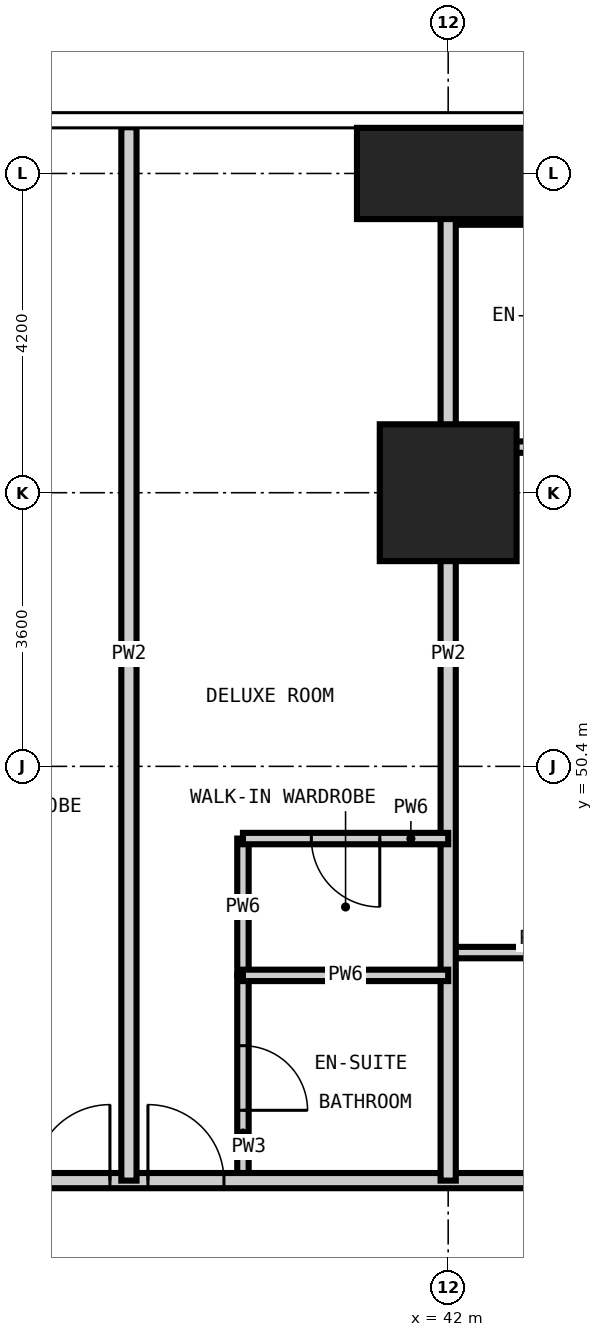
"""IFC4 building model, lengths in metres.
Left out: names, types, materials, properties, quantities, classifications, styles, units other than length and angle.
Written with IfcOpenShell. Run it as: python <this file> out.ifc"""

import sys

from ifc_helpers import new_model, si_unit, direction, frame, frame_2d, origin, origin_2d, place, context, subcontext, project, spatial, rectangle, extrude, element, fill, save


model = new_model("IFC4")
c1 = context("Model", 3, precision=1e-05, world=origin(), true_north=direction((0.0, 1.0)))
c2 = subcontext(c1, "Body", "Model", "MODEL_VIEW")
j1 = project(units=[si_unit("LENGTHUNIT", "METRE"), si_unit("PLANEANGLEUNIT", "RADIAN")], contexts=[c1])
p1 = place(None, origin())
s1 = spatial("IfcSite", under=j1, at=p1, CompositionType="ELEMENT")
p2 = place(p1, origin())
s2 = spatial("IfcBuilding", under=s1, at=p2, CompositionType="ELEMENT")
p3 = place(p2, frame((0.0, 0.0, 63.0)))
s3 = spatial("IfcBuildingStorey", under=s2, at=p3, CompositionType="ELEMENT", Elevation=63.0)
p4 = place(p3, frame((42.0, 54.0, -0.35), z_axis=(0.0, 0.0, 1.0), x_axis=(1.0, 0.0, 0.0)))
e1 = element("IfcColumn", 1, at=p4, inside=s3, PredefinedType="COLUMN", context=c2, shape_type="SweptSolid", body=[
    extrude(rectangle(XDim=1.8, YDim=1.8, at=origin_2d()), origin(), (0.0, 0.0, 1.0), 3.6),
])
p5 = place(p3, frame((42.0, 58.2, -0.35), z_axis=(0.0, 0.0, 1.0), x_axis=(1.0, 0.0, 0.0)))
e2 = element("IfcColumn", 2, at=p5, inside=s3, PredefinedType="COLUMN", context=c2, shape_type="SweptSolid", body=[
    extrude(rectangle(XDim=2.4, YDim=1.2, at=origin_2d()), origin(), (0.0, 0.0, 1.0), 3.6),
])
p6 = place(p3, frame((39.3, 44.95, 0.0), z_axis=(0.0, 0.0, 1.0), x_axis=(0.0, 1.0, 0.0)))
e3 = element("IfcWall", 3, at=p6, inside=s3, PredefinedType="PARTITIONING", context=c2, shape_type="SweptSolid", body=[
    extrude(rectangle(XDim=2.7, YDim=0.15, at=frame_2d((1.35, 0.0))), origin(), (0.0, 0.0, 1.0), 3.25),
])
p7 = place(p6, frame((0.925, 0.0, 0.0)))
e4 = element("IfcOpeningElement", 4, at=p7, cuts=e3, PredefinedType="OPENING", context=c2, shape_type="SweptSolid", body=[
    extrude(rectangle(XDim=0.85, YDim=2.1, at=frame_2d((0.425, 1.05))), frame((0.0, 0.085, 0.0), z_axis=(0.0, -1.0, 0.0), x_axis=(1.0, 0.0, 0.0)), (0.0, 0.0, 1.0), 0.17),
])
p8 = place(p3, frame((42.0, 47.95, 0.0), z_axis=(0.0, 0.0, 1.0), x_axis=(1.0, 0.0, 0.0)))
e5 = element("IfcWall", 5, at=p8, inside=s3, PredefinedType="PARTITIONING", context=c2, shape_type="SweptSolid", body=[
    extrude(rectangle(XDim=4.15, YDim=0.15, at=frame_2d((2.075, 0.0))), origin(), (0.0, 0.0, 1.0), 3.25),
])
p9 = place(p8, frame((1.65, 0.0, 0.0)))
e6 = element("IfcOpeningElement", 6, at=p9, cuts=e5, PredefinedType="OPENING", context=c2, shape_type="SweptSolid", body=[
    extrude(rectangle(XDim=0.85, YDim=2.1, at=frame_2d((0.425, 1.05))), frame((0.0, 0.085, 0.0), z_axis=(0.0, -1.0, 0.0), x_axis=(1.0, 0.0, 0.0)), (0.0, 0.0, 1.0), 0.17),
])
p10 = place(p3, frame((42.0, 57.6, 0.0), z_axis=(0.0, 0.0, 1.0), x_axis=(1.0, 0.0, 0.0)))
e7 = element("IfcWall", 7, at=p10, inside=s3, PredefinedType="PARTITIONING", context=c2, shape_type="SweptSolid", body=[
    extrude(rectangle(XDim=3.6, YDim=0.15, at=frame_2d((1.8, 0.0))), origin(), (0.0, 0.0, 1.0), 3.25),
])
p11 = place(p10, frame((1.375, 0.0, 0.0)))
e8 = element("IfcOpeningElement", 8, at=p11, cuts=e7, PredefinedType="OPENING", context=c2, shape_type="SweptSolid", body=[
    extrude(rectangle(XDim=0.85, YDim=2.1, at=frame_2d((0.425, 1.05))), frame((0.0, 0.085, 0.0), z_axis=(0.0, -1.0, 0.0), x_axis=(1.0, 0.0, 0.0)), (0.0, 0.0, 1.0), 0.17),
])
p12 = place(p3, frame((13.25, 44.95, 0.0), z_axis=(0.0, 0.0, 1.0), x_axis=(1.0, 0.0, 0.0)))
e9 = element("IfcWall", 9, at=p12, inside=s3, PredefinedType="PARTITIONING", context=c2, shape_type="SweptSolid", body=[
    extrude(rectangle(XDim=32.9, YDim=0.2, at=frame_2d((16.45, 0.0))), origin(), (0.0, 0.0, 1.0), 3.25),
])
p13 = place(p12, frame((6.5, 0.0, 0.0)))
e10 = element("IfcOpeningElement", 10, at=p13, cuts=e9, PredefinedType="OPENING", context=c2, shape_type="SweptSolid", body=[
    extrude(rectangle(XDim=1.0, YDim=2.2, at=frame_2d((0.5, 1.1))), frame((0.0, 0.11, 0.0), z_axis=(0.0, -1.0, 0.0), x_axis=(1.0, 0.0, 0.0)), (0.0, 0.0, 1.0), 0.22),
])
p14 = place(p12, frame((8.0, 0.0, 0.0)))
e11 = element("IfcOpeningElement", 11, at=p14, cuts=e9, PredefinedType="OPENING", context=c2, shape_type="SweptSolid", body=[
    extrude(rectangle(XDim=1.0, YDim=2.2, at=frame_2d((0.5, 1.1))), frame((0.0, 0.11, 0.0), z_axis=(0.0, -1.0, 0.0), x_axis=(1.0, 0.0, 0.0)), (0.0, 0.0, 1.0), 0.22),
])
p15 = place(p12, frame((14.9, 0.0, 0.0)))
e12 = element("IfcOpeningElement", 12, at=p15, cuts=e9, PredefinedType="OPENING", context=c2, shape_type="SweptSolid", body=[
    extrude(rectangle(XDim=1.0, YDim=2.2, at=frame_2d((0.5, 1.1))), frame((0.0, 0.11, 0.0), z_axis=(0.0, -1.0, 0.0), x_axis=(1.0, 0.0, 0.0)), (0.0, 0.0, 1.0), 0.22),
])
p16 = place(p12, frame((16.4, 0.0, 0.0)))
e13 = element("IfcOpeningElement", 13, at=p16, cuts=e9, PredefinedType="OPENING", context=c2, shape_type="SweptSolid", body=[
    extrude(rectangle(XDim=1.0, YDim=2.2, at=frame_2d((0.5, 1.1))), frame((0.0, 0.11, 0.0), z_axis=(0.0, -1.0, 0.0), x_axis=(1.0, 0.0, 0.0)), (0.0, 0.0, 1.0), 0.22),
])
p17 = place(p12, frame((23.3, 0.0, 0.0)))
e14 = element("IfcOpeningElement", 14, at=p17, cuts=e9, PredefinedType="OPENING", context=c2, shape_type="SweptSolid", body=[
    extrude(rectangle(XDim=1.0, YDim=2.2, at=frame_2d((0.5, 1.1))), frame((0.0, 0.11, 0.0), z_axis=(0.0, -1.0, 0.0), x_axis=(1.0, 0.0, 0.0)), (0.0, 0.0, 1.0), 0.22),
])
p18 = place(p12, frame((24.8, 0.0, 0.0)))
e15 = element("IfcOpeningElement", 15, at=p18, cuts=e9, PredefinedType="OPENING", context=c2, shape_type="SweptSolid", body=[
    extrude(rectangle(XDim=1.0, YDim=2.2, at=frame_2d((0.5, 1.1))), frame((0.0, 0.11, 0.0), z_axis=(0.0, -1.0, 0.0), x_axis=(1.0, 0.0, 0.0)), (0.0, 0.0, 1.0), 0.22),
])
for number, where, z_axis, x_axis in (
    (16, (37.8, 44.95, 0.0), (0.0, 0.0, 1.0), (0.0, 1.0, 0.0)),
    (17, (42.0, 44.95, 0.0), (0.0, 0.0, 1.0), (0.0, 1.0, 0.0)),
):
    element("IfcWall", number, at=place(p3, frame(where, z_axis=z_axis, x_axis=x_axis)), inside=s3, PredefinedType="PARTITIONING", context=c2, shape_type="SweptSolid", body=[
        extrude(rectangle(XDim=13.858, YDim=0.2, at=frame_2d((6.929, 0.0))), origin(), (0.0, 0.0, 1.0), 3.25),
    ])
p19 = place(p3, frame((39.3, 47.65, 0.0), z_axis=(0.0, 0.0, 1.0), x_axis=(0.0, 1.0, 0.0)))
e18 = element("IfcWall", 18, at=p19, inside=s3, PredefinedType="PARTITIONING", context=c2, shape_type="SweptSolid", body=[
    extrude(rectangle(XDim=1.8, YDim=0.15, at=frame_2d((0.9, 0.0))), origin(), (0.0, 0.0, 1.0), 3.25),
])
p20 = place(p3, frame((39.3, 47.65, 0.0), z_axis=(0.0, 0.0, 1.0), x_axis=(1.0, 0.0, 0.0)))
e19 = element("IfcWall", 19, at=p20, inside=s3, PredefinedType="PARTITIONING", context=c2, shape_type="SweptSolid", body=[
    extrude(rectangle(XDim=2.7, YDim=0.15, at=frame_2d((1.35, 0.0))), origin(), (0.0, 0.0, 1.0), 3.25),
])
p21 = place(p3, frame((39.3, 49.45, 0.0), z_axis=(0.0, 0.0, 1.0), x_axis=(1.0, 0.0, 0.0)))
e20 = element("IfcWall", 20, at=p21, inside=s3, PredefinedType="PARTITIONING", context=c2, shape_type="SweptSolid", body=[
    extrude(rectangle(XDim=2.7, YDim=0.15, at=frame_2d((1.35, 0.0))), origin(), (0.0, 0.0, 1.0), 3.25),
])
p22 = place(p21, frame((0.9, 0.0, 0.0)))
e21 = element("IfcOpeningElement", 21, at=p22, cuts=e20, PredefinedType="OPENING", context=c2, shape_type="SweptSolid", body=[
    extrude(rectangle(XDim=0.9, YDim=2.1, at=frame_2d((0.45, 1.05))), frame((0.0, 0.085, 0.0), z_axis=(0.0, -1.0, 0.0), x_axis=(1.0, 0.0, 0.0)), (0.0, 0.0, 1.0), 0.17),
])
p23 = place(p3, frame((42.0, 54.6, 0.0), z_axis=(0.0, 0.0, 1.0), x_axis=(1.0, 0.0, 0.0)))
e22 = element("IfcWall", 22, at=p23, inside=s3, PredefinedType="PARTITIONING", context=c2, shape_type="SweptSolid", body=[
    extrude(rectangle(XDim=16.808, YDim=0.15, at=frame_2d((8.404, 0.0))), origin(), (0.0, 0.0, 1.0), 3.25),
])
p24 = place(p23, frame((10.95, 0.0, 0.0)))
e23 = element("IfcOpeningElement", 23, at=p24, cuts=e22, PredefinedType="OPENING", context=c2, shape_type="SweptSolid", body=[
    extrude(rectangle(XDim=0.9, YDim=2.1, at=frame_2d((0.45, 1.05))), frame((0.0, 0.085, 0.0), z_axis=(0.0, -1.0, 0.0), x_axis=(1.0, 0.0, 0.0)), (0.0, 0.0, 1.0), 0.17),
])
p25 = place(p17, origin())
e24 = element("IfcDoor", 24, at=p25, inside=s3, OperationType="SINGLE_SWING_RIGHT", PredefinedType="DOOR", context=c2, shape_type="SweptSolid", body=[
    extrude(rectangle(XDim=1.0, YDim=2.2, at=frame_2d((0.5, 1.1))), frame((0.0, 0.025, 0.0), z_axis=(0.0, -1.0, 0.0), x_axis=(1.0, 0.0, 0.0)), (0.0, 0.0, 1.0), 0.05),
])
fill(e14, e24)
p26 = place(p18, origin())
e25 = element("IfcDoor", 25, at=p26, inside=s3, OperationType="SINGLE_SWING_LEFT", PredefinedType="DOOR", context=c2, shape_type="SweptSolid", body=[
    extrude(rectangle(XDim=1.0, YDim=2.2, at=frame_2d((0.5, 1.1))), frame((0.0, 0.025, 0.0), z_axis=(0.0, -1.0, 0.0), x_axis=(1.0, 0.0, 0.0)), (0.0, 0.0, 1.0), 0.05),
])
fill(e15, e25)
p27 = place(p7, frame((0.85, 0.0, 0.0), z_axis=(0.0, 0.0, 1.0), x_axis=(-1.0, 0.0, 0.0)))
e26 = element("IfcDoor", 26, at=p27, inside=s3, OperationType="SINGLE_SWING_RIGHT", PredefinedType="DOOR", context=c2, shape_type="SweptSolid", body=[
    extrude(rectangle(XDim=0.85, YDim=2.1, at=frame_2d((0.425, 1.05))), frame((0.0, 0.025, 0.0), z_axis=(0.0, -1.0, 0.0), x_axis=(1.0, 0.0, 0.0)), (0.0, 0.0, 1.0), 0.05),
])
fill(e4, e26)
p28 = place(p22, frame((0.9, 0.0, 0.0), z_axis=(0.0, 0.0, 1.0), x_axis=(-1.0, 0.0, 0.0)))
e27 = element("IfcDoor", 27, at=p28, inside=s3, OperationType="SINGLE_SWING_LEFT", PredefinedType="DOOR", context=c2, shape_type="SweptSolid", body=[
    extrude(rectangle(XDim=0.9, YDim=2.1, at=frame_2d((0.45, 1.05))), frame((0.0, 0.025, 0.0), z_axis=(0.0, -1.0, 0.0), x_axis=(1.0, 0.0, 0.0)), (0.0, 0.0, 1.0), 0.05),
])
fill(e21, e27)
save(model, sys.argv[1])
